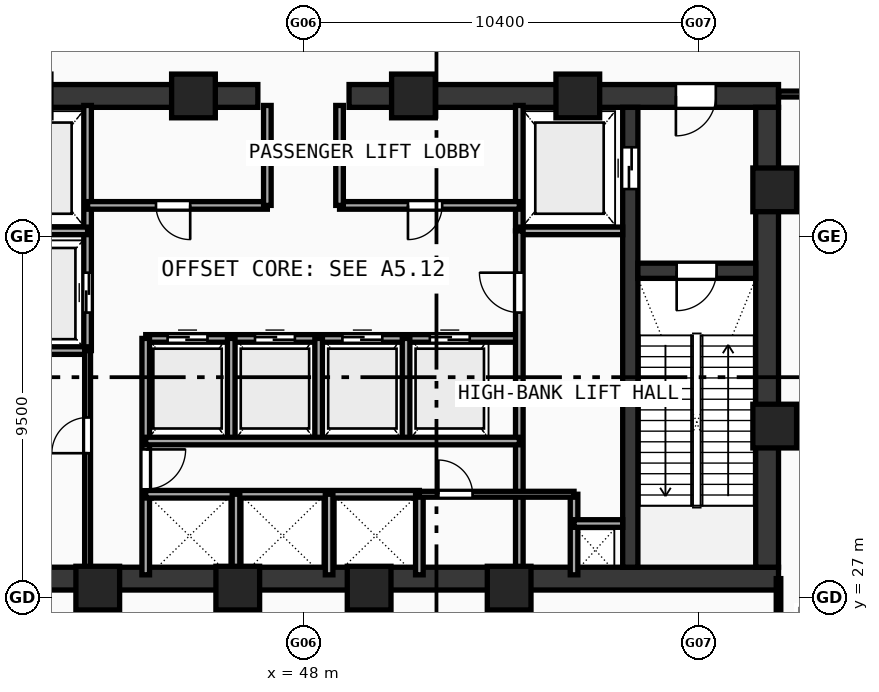
"""IFC4 building model, lengths in metres.
Left out: names, types, materials, properties, quantities, classifications, styles, units other than length and angle.
Written with IfcOpenShell. Run it as: python <this file> out.ifc"""

import sys

from ifc_helpers import new_model, si_unit, direction, frame, frame_2d, origin, origin_with_axes, origin_2d, place, context, subcontext, project, spatial, rectangle, hollow_rectangle, extrude, source, transform, mapped, element, fill, save


model = new_model("IFC4")
c1 = context("Model", 3, precision=1e-05, world=origin(), true_north=direction((0.0, 1.0)))
c2 = subcontext(c1, "Body", "Model", "MODEL_VIEW")
j1 = project(units=[si_unit("LENGTHUNIT", "METRE"), si_unit("PLANEANGLEUNIT", "RADIAN")], contexts=[c1])
p1 = place(None, origin())
s1 = spatial("IfcSite", under=j1, at=p1, CompositionType="ELEMENT")
p2 = place(p1, origin())
s2 = spatial("IfcBuilding", under=s1, at=p2, CompositionType="ELEMENT")
p3 = place(p2, frame((0.0, 0.0, 170.31)))
s3 = spatial("IfcBuildingStorey", under=s2, at=p3, CompositionType="ELEMENT", Elevation=170.31)
p4 = place(p3, frame((35.5, 27.5, 0.0), z_axis=(0.0, 0.0, 1.0), x_axis=(1.0, 0.0, 0.0)))
e1 = element("IfcWall", 1, at=p4, inside=s3, PredefinedType="SHEAR", context=c2, shape_type="SweptSolid", body=[
    extrude(rectangle(XDim=25.0, YDim=0.6, at=frame_2d((12.5, 0.0))), origin(), (0.0, 0.0, 1.0), 5.57),
])
p5 = place(p3, frame((35.5, 40.2, 0.0), z_axis=(0.0, 0.0, 1.0), x_axis=(1.0, 0.0, 0.0)))
e2 = element("IfcWall", 2, at=p5, inside=s3, PredefinedType="SHEAR", context=c2, shape_type="SweptSolid", body=[
    extrude(rectangle(XDim=11.3, YDim=0.6, at=frame_2d((5.65, 0.0))), origin(), (0.0, 0.0, 1.0), 5.57),
])
p6 = place(p5, frame((1.65, 0.0, 0.0)))
e3 = element("IfcOpeningElement", 3, at=p6, cuts=e2, PredefinedType="OPENING", context=c2, shape_type="SweptSolid", body=[
    extrude(rectangle(XDim=1.05, YDim=2.1, at=frame_2d((0.525, 1.05))), frame((0.0, 0.31, 0.0), z_axis=(0.0, -1.0, 0.0), x_axis=(1.0, 0.0, 0.0)), (0.0, 0.0, 1.0), 0.62),
])
p7 = place(p3, frame((49.2, 40.2, 0.0), z_axis=(0.0, 0.0, 1.0), x_axis=(1.0, 0.0, 0.0)))
e4 = element("IfcWall", 4, at=p7, inside=s3, PredefinedType="SHEAR", context=c2, shape_type="SweptSolid", body=[
    extrude(rectangle(XDim=11.3, YDim=0.6, at=frame_2d((5.65, 0.0))), origin(), (0.0, 0.0, 1.0), 5.57),
])
p8 = place(p7, frame((8.6, 0.0, 0.0)))
e5 = element("IfcOpeningElement", 5, at=p8, cuts=e4, PredefinedType="OPENING", context=c2, shape_type="SweptSolid", body=[
    extrude(rectangle(XDim=1.05, YDim=2.1, at=frame_2d((0.525, 1.05))), frame((0.0, 0.31, 0.0), z_axis=(0.0, -1.0, 0.0), x_axis=(1.0, 0.0, 0.0)), (0.0, 0.0, 1.0), 0.62),
])
p9 = place(p3, frame((60.2, 27.8, 0.0), z_axis=(0.0, 0.0, 1.0), x_axis=(0.0, 1.0, 0.0)))
e6 = element("IfcWall", 6, at=p9, inside=s3, PredefinedType="SHEAR", context=c2, shape_type="SweptSolid", body=[
    extrude(rectangle(XDim=12.1, YDim=0.6, at=frame_2d((6.05, 0.0))), origin(), (0.0, 0.0, 1.0), 5.57),
])
p10 = place(p3, frame((56.6, 27.8, 0.0), z_axis=(0.0, 0.0, 1.0), x_axis=(0.0, 1.0, 0.0)))
e7 = element("IfcWall", 7, at=p10, inside=s3, PredefinedType="SHEAR", context=c2, shape_type="SweptSolid", body=[
    extrude(rectangle(XDim=12.1, YDim=0.4, at=frame_2d((6.05, 0.0))), origin(), (0.0, 0.0, 1.0), 5.57),
])
p11 = place(p10, frame((9.95, 0.0, 0.0)))
e8 = element("IfcOpeningElement", 8, at=p11, cuts=e7, PredefinedType="OPENING", context=c2, shape_type="SweptSolid", body=[
    extrude(rectangle(XDim=1.1, YDim=2.1, at=frame_2d((0.55, 1.05))), frame((0.0, 0.21, 0.0), z_axis=(0.0, -1.0, 0.0), x_axis=(1.0, 0.0, 0.0)), (0.0, 0.0, 1.0), 0.42),
])
p12 = place(p3, frame((56.8, 35.6, 0.0), z_axis=(0.0, 0.0, 1.0), x_axis=(1.0, 0.0, 0.0)))
e9 = element("IfcWall", 9, at=p12, inside=s3, PredefinedType="SHEAR", context=c2, shape_type="SweptSolid", body=[
    extrude(rectangle(XDim=3.1, YDim=0.4, at=frame_2d((1.55, 0.0))), origin(), (0.0, 0.0, 1.0), 5.57),
])
p13 = place(p12, frame((1.02, 0.0, 0.0)))
e10 = element("IfcOpeningElement", 10, at=p13, cuts=e9, PredefinedType="OPENING", context=c2, shape_type="SweptSolid", body=[
    extrude(rectangle(XDim=1.05, YDim=2.1, at=frame_2d((0.525, 1.05))), frame((0.0, 0.21, 0.0), z_axis=(0.0, -1.0, 0.0), x_axis=(1.0, 0.0, 0.0)), (0.0, 0.0, 1.0), 0.42),
])
m1 = source(origin(), c2, "Body", "SweptSolid", [
    extrude(hollow_rectangle(XDim=1.15, YDim=1.15, WallThickness=0.048, at=origin_2d()), origin(), (0.0, 0.0, 1.0), 5.83),
])
for number, where, z_axis, x_axis in (
    (11, (42.588, 27.25, -0.26), (0.0, 0.0, 1.0), (1.0, 0.0, 0.0)),
    (12, (46.272, 27.25, -0.26), (0.0, 0.0, 1.0), (1.0, 0.0, 0.0)),
    (13, (49.729, 27.25, -0.26), (0.0, 0.0, 1.0), (1.0, 0.0, 0.0)),
    (14, (53.412, 27.25, -0.26), (0.0, 0.0, 1.0), (1.0, 0.0, 0.0)),
    (15, (60.4, 31.513, -0.26), (0.0, 0.0, 1.0), (1.0, 0.0, 0.0)),
    (16, (60.4, 37.729, -0.26), (0.0, 0.0, 1.0), (1.0, 0.0, 0.0)),
    (17, (55.219, 40.2, -0.26), (0.0, 0.0, 1.0), (1.0, 0.0, 0.0)),
    (18, (50.894, 40.2, -0.26), (0.0, 0.0, 1.0), (1.0, 0.0, 0.0)),
    (19, (45.106, 40.2, -0.26), (0.0, 0.0, 1.0), (1.0, 0.0, 0.0)),
):
    element("IfcColumn", number, at=place(p3, frame(where, z_axis=z_axis, x_axis=x_axis)), inside=s3, PredefinedType="COLUMN", context=c2, shape_type="MappedRepresentation", body=[
        mapped(m1, transform((0.0, 0.0, 0.0), scale=1.0)),
    ])
p14 = place(p3, frame((42.32, 33.5, 0.0), z_axis=(0.0, 0.0, 1.0), x_axis=(0.0, 1.0, 0.0)))
e20 = element("IfcWall", 20, at=p14, inside=s3, PredefinedType="SOLIDWALL", context=c2, shape_type="SweptSolid", body=[
    extrude(rectangle(XDim=6.45, YDim=0.2, at=frame_2d((3.225, 0.0))), origin(), (0.0, 0.0, 1.0), 5.57),
])
p15 = place(p14, frame((1.0, 0.0, 0.0)))
e21 = element("IfcOpeningElement", 21, at=p15, cuts=e20, PredefinedType="OPENING", context=c2, shape_type="SweptSolid", body=[
    extrude(rectangle(XDim=1.05, YDim=2.1, at=frame_2d((0.525, 1.05))), frame((0.0, 0.11, 0.0), z_axis=(0.0, -1.0, 0.0), x_axis=(1.0, 0.0, 0.0)), (0.0, 0.0, 1.0), 0.22),
])
for number, where, z_axis, x_axis in (
    (22, (39.6, 36.65, 0.0), (0.0, 0.0, 1.0), (1.0, 0.0, 0.0)),
    (23, (39.6, 33.5, 0.0), (0.0, 0.0, 1.0), (1.0, 0.0, 0.0)),
):
    element("IfcWall", number, at=place(p3, frame(where, z_axis=z_axis, x_axis=x_axis)), inside=s3, PredefinedType="SOLIDWALL", context=c2, shape_type="SweptSolid", body=[
        extrude(rectangle(XDim=2.72, YDim=0.2, at=frame_2d((1.36, 0.0))), origin(), (0.0, 0.0, 1.0), 5.57),
    ])
p16 = place(p3, frame((53.68, 36.65, 0.0), z_axis=(0.0, 0.0, 1.0), x_axis=(0.0, 1.0, 0.0)))
e24 = element("IfcWall", 24, at=p16, inside=s3, PredefinedType="SOLIDWALL", context=c2, shape_type="SweptSolid", body=[
    extrude(rectangle(XDim=3.3, YDim=0.2, at=frame_2d((1.65, 0.0))), origin(), (0.0, 0.0, 1.0), 5.57),
])
p17 = place(p3, frame((53.68, 36.65, 0.0), z_axis=(0.0, 0.0, 1.0), x_axis=(1.0, 0.0, 0.0)))
e25 = element("IfcWall", 25, at=p17, inside=s3, PredefinedType="SOLIDWALL", context=c2, shape_type="SweptSolid", body=[
    extrude(rectangle(XDim=2.72, YDim=0.2, at=frame_2d((1.36, 0.0))), origin(), (0.0, 0.0, 1.0), 5.57),
])
p18 = place(p3, frame((42.32, 37.32, 0.0), z_axis=(0.0, 0.0, 1.0), x_axis=(1.0, 0.0, 0.0)))
e26 = element("IfcWall", 26, at=p18, inside=s3, PredefinedType="SOLIDWALL", context=c2, shape_type="SweptSolid", body=[
    extrude(rectangle(XDim=4.73, YDim=0.2, at=frame_2d((2.365, 0.0))), origin(), (0.0, 0.0, 1.0), 5.57),
])
p19 = place(p18, frame((1.8, 0.0, 0.0)))
e27 = element("IfcOpeningElement", 27, at=p19, cuts=e26, PredefinedType="OPENING", context=c2, shape_type="SweptSolid", body=[
    extrude(rectangle(XDim=0.9, YDim=2.1, at=frame_2d((0.45, 1.05))), frame((0.0, 0.11, 0.0), z_axis=(0.0, -1.0, 0.0), x_axis=(1.0, 0.0, 0.0)), (0.0, 0.0, 1.0), 0.22),
])
p20 = place(p3, frame((48.95, 37.32, 0.0), z_axis=(0.0, 0.0, 1.0), x_axis=(1.0, 0.0, 0.0)))
e28 = element("IfcWall", 28, at=p20, inside=s3, PredefinedType="SOLIDWALL", context=c2, shape_type="SweptSolid", body=[
    extrude(rectangle(XDim=4.73, YDim=0.2, at=frame_2d((2.365, 0.0))), origin(), (0.0, 0.0, 1.0), 5.57),
])
p21 = place(p20, frame((1.8, 0.0, 0.0)))
e29 = element("IfcOpeningElement", 29, at=p21, cuts=e28, PredefinedType="OPENING", context=c2, shape_type="SweptSolid", body=[
    extrude(rectangle(XDim=0.9, YDim=2.1, at=frame_2d((0.45, 1.05))), frame((0.0, 0.11, 0.0), z_axis=(0.0, -1.0, 0.0), x_axis=(1.0, 0.0, 0.0)), (0.0, 0.0, 1.0), 0.22),
])
for number, where, z_axis, x_axis in (
    (30, (47.05, 37.32, 0.0), (0.0, 0.0, 1.0), (0.0, 1.0, 0.0)),
    (31, (48.95, 37.32, 0.0), (0.0, 0.0, 1.0), (0.0, 1.0, 0.0)),
):
    element("IfcWall", number, at=place(p3, frame(where, z_axis=z_axis, x_axis=x_axis)), inside=s3, PredefinedType="SOLIDWALL", context=c2, shape_type="SweptSolid", body=[
        extrude(rectangle(XDim=2.63, YDim=0.2, at=frame_2d((1.315, 0.0))), origin(), (0.0, 0.0, 1.0), 5.57),
    ])
p22 = place(p3, frame((43.85, 33.82, 0.0), z_axis=(0.0, 0.0, 1.0), x_axis=(1.0, 0.0, 0.0)))
e32 = element("IfcWall", 32, at=p22, inside=s3, PredefinedType="SOLIDWALL", context=c2, shape_type="SweptSolid", body=[
    extrude(rectangle(XDim=9.83, YDim=0.2, at=frame_2d((4.915, 0.0))), origin(), (0.0, 0.0, 1.0), 5.57),
])
p23 = place(p22, frame((0.575, 0.0, 0.0)))
e33 = element("IfcOpeningElement", 33, at=p23, cuts=e32, PredefinedType="OPENING", context=c2, shape_type="SweptSolid", body=[
    extrude(rectangle(XDim=1.05, YDim=2.1, at=frame_2d((0.525, 1.05))), frame((0.0, 0.11, 0.0), z_axis=(0.0, -1.0, 0.0), x_axis=(1.0, 0.0, 0.0)), (0.0, 0.0, 1.0), 0.22),
])
p24 = place(p22, frame((2.875, 0.0, 0.0)))
e34 = element("IfcOpeningElement", 34, at=p24, cuts=e32, PredefinedType="OPENING", context=c2, shape_type="SweptSolid", body=[
    extrude(rectangle(XDim=1.05, YDim=2.1, at=frame_2d((0.525, 1.05))), frame((0.0, 0.11, 0.0), z_axis=(0.0, -1.0, 0.0), x_axis=(1.0, 0.0, 0.0)), (0.0, 0.0, 1.0), 0.22),
])
p25 = place(p22, frame((5.175, 0.0, 0.0)))
e35 = element("IfcOpeningElement", 35, at=p25, cuts=e32, PredefinedType="OPENING", context=c2, shape_type="SweptSolid", body=[
    extrude(rectangle(XDim=1.05, YDim=2.1, at=frame_2d((0.525, 1.05))), frame((0.0, 0.11, 0.0), z_axis=(0.0, -1.0, 0.0), x_axis=(1.0, 0.0, 0.0)), (0.0, 0.0, 1.0), 0.22),
])
p26 = place(p22, frame((7.475, 0.0, 0.0)))
e36 = element("IfcOpeningElement", 36, at=p26, cuts=e32, PredefinedType="OPENING", context=c2, shape_type="SweptSolid", body=[
    extrude(rectangle(XDim=1.05, YDim=2.1, at=frame_2d((0.525, 1.05))), frame((0.0, 0.11, 0.0), z_axis=(0.0, -1.0, 0.0), x_axis=(1.0, 0.0, 0.0)), (0.0, 0.0, 1.0), 0.22),
])
p27 = place(p3, frame((43.85, 27.6, 0.0), z_axis=(0.0, 0.0, 1.0), x_axis=(0.0, 1.0, 0.0)))
e37 = element("IfcWall", 37, at=p27, inside=s3, PredefinedType="SOLIDWALL", context=c2, shape_type="SweptSolid", body=[
    extrude(rectangle(XDim=6.22, YDim=0.2, at=frame_2d((3.11, 0.0))), origin(), (0.0, 0.0, 1.0), 5.57),
])
p28 = place(p27, frame((2.25, 0.0, 0.0)))
e38 = element("IfcOpeningElement", 38, at=p28, cuts=e37, PredefinedType="OPENING", context=c2, shape_type="SweptSolid", body=[
    extrude(rectangle(XDim=1.05, YDim=2.1, at=frame_2d((0.525, 1.05))), frame((0.0, 0.11, 0.0), z_axis=(0.0, -1.0, 0.0), x_axis=(1.0, 0.0, 0.0)), (0.0, 0.0, 1.0), 0.22),
])
p29 = place(p3, frame((53.68, 27.6, 0.0), z_axis=(0.0, 0.0, 1.0), x_axis=(0.0, 1.0, 0.0)))
e39 = element("IfcWall", 39, at=p29, inside=s3, PredefinedType="SOLIDWALL", context=c2, shape_type="SweptSolid", body=[
    extrude(rectangle(XDim=9.05, YDim=0.2, at=frame_2d((4.525, 0.0))), origin(), (0.0, 0.0, 1.0), 2.22),
])
p30 = place(p29, frame((6.9, 0.0, 0.0)))
e40 = element("IfcOpeningElement", 40, at=p30, cuts=e39, PredefinedType="OPENING", context=c2, shape_type="SweptSolid", body=[
    extrude(rectangle(XDim=1.05, YDim=2.1, at=frame_2d((0.525, 1.05))), frame((0.0, 0.11, 0.0), z_axis=(0.0, -1.0, 0.0), x_axis=(1.0, 0.0, 0.0)), (0.0, 0.0, 1.0), 0.22),
])
for number, where, z_axis, x_axis in (
    (41, (46.1, 31.12, 0.0), (0.0, 0.0, 1.0), (0.0, 1.0, 0.0)),
    (42, (48.4, 31.12, 0.0), (0.0, 0.0, 1.0), (0.0, 1.0, 0.0)),
    (43, (50.7, 31.12, 0.0), (0.0, 0.0, 1.0), (0.0, 1.0, 0.0)),
):
    element("IfcWall", number, at=place(p3, frame(where, z_axis=z_axis, x_axis=x_axis)), inside=s3, PredefinedType="SOLIDWALL", context=c2, shape_type="SweptSolid", body=[
        extrude(rectangle(XDim=2.7, YDim=0.2, at=frame_2d((1.35, 0.0))), origin(), (0.0, 0.0, 1.0), 5.57),
    ])
p31 = place(p3, frame((43.85, 29.72, 0.0), z_axis=(0.0, 0.0, 1.0), x_axis=(1.0, 0.0, 0.0)))
e44 = element("IfcWall", 44, at=p31, inside=s3, PredefinedType="SOLIDWALL", context=c2, shape_type="SweptSolid", body=[
    extrude(rectangle(XDim=7.2, YDim=0.2, at=frame_2d((3.6, 0.0))), origin(), (0.0, 0.0, 1.0), 5.57),
])
p32 = place(p3, frame((51.05, 27.6, 0.0), z_axis=(0.0, 0.0, 1.0), x_axis=(0.0, 1.0, 0.0)))
e45 = element("IfcWall", 45, at=p32, inside=s3, PredefinedType="SOLIDWALL", context=c2, shape_type="SweptSolid", body=[
    extrude(rectangle(XDim=2.12, YDim=0.2, at=frame_2d((1.06, 0.0))), origin(), (0.0, 0.0, 1.0), 5.57),
])
p33 = place(p3, frame((43.85, 31.12, 0.0), z_axis=(0.0, 0.0, 1.0), x_axis=(1.0, 0.0, 0.0)))
e46 = element("IfcWall", 46, at=p33, inside=s3, PredefinedType="SOLIDWALL", context=c2, shape_type="SweptSolid", body=[
    extrude(rectangle(XDim=9.83, YDim=0.2, at=frame_2d((4.915, 0.0))), origin(), (0.0, 0.0, 1.0), 5.57),
])
p34 = place(p3, frame((46.225, 27.6, 0.0), z_axis=(0.0, 0.0, 1.0), x_axis=(0.0, 1.0, 0.0)))
e47 = element("IfcWall", 47, at=p34, inside=s3, PredefinedType="SOLIDWALL", context=c2, shape_type="SweptSolid", body=[
    extrude(rectangle(XDim=2.12, YDim=0.2, at=frame_2d((1.06, 0.0))), origin(), (0.0, 0.0, 1.0), 2.22),
])
for number, where, z_axis, x_axis in (
    (48, (48.675, 27.6, 0.0), (0.0, 0.0, 1.0), (0.0, 1.0, 0.0)),
    (49, (55.12, 27.6, 0.0), (0.0, 0.0, 1.0), (0.0, 1.0, 0.0)),
):
    element("IfcWall", number, at=place(p3, frame(where, z_axis=z_axis, x_axis=x_axis)), inside=s3, PredefinedType="SOLIDWALL", context=c2, shape_type="SweptSolid", body=[
        extrude(rectangle(XDim=2.12, YDim=0.2, at=frame_2d((1.06, 0.0))), origin(), (0.0, 0.0, 1.0), 5.57),
    ])
p35 = place(p3, frame((55.12, 28.95, 0.0), z_axis=(0.0, 0.0, 1.0), x_axis=(1.0, 0.0, 0.0)))
e50 = element("IfcWall", 50, at=p35, inside=s3, PredefinedType="SOLIDWALL", context=c2, shape_type="SweptSolid", body=[
    extrude(rectangle(XDim=1.28, YDim=0.2, at=frame_2d((0.64, 0.0))), origin(), (0.0, 0.0, 1.0), 5.57),
])
p36 = place(p3, frame((42.32, 27.6, 0.0), z_axis=(0.0, 0.0, 1.0), x_axis=(0.0, 1.0, 0.0)))
e51 = element("IfcWall", 51, at=p36, inside=s3, PredefinedType="PARTITIONING", context=c2, shape_type="SweptSolid", body=[
    extrude(rectangle(XDim=5.9, YDim=0.155, at=frame_2d((2.95, 0.0))), origin(), (0.0, 0.0, 1.0), 2.22),
])
p37 = place(p36, frame((3.2, 0.0, 0.0)))
e52 = element("IfcOpeningElement", 52, at=p37, cuts=e51, PredefinedType="OPENING", context=c2, shape_type="SweptSolid", body=[
    extrude(rectangle(XDim=0.94, YDim=2.1, at=frame_2d((0.47, 1.05))), frame((0.0, 0.087, 0.0), z_axis=(0.0, -1.0, 0.0), x_axis=(1.0, 0.0, 0.0)), (0.0, 0.0, 1.0), 0.175),
])
p38 = place(p3, frame((51.05, 29.72, 0.0), z_axis=(0.0, 0.0, 1.0), x_axis=(1.0, 0.0, 0.0)))
e53 = element("IfcWall", 53, at=p38, inside=s3, PredefinedType="PARTITIONING", context=c2, shape_type="SweptSolid", body=[
    extrude(rectangle(XDim=4.07, YDim=0.155, at=frame_2d((2.035, 0.0))), origin(), (0.0, 0.0, 1.0), 5.57),
])
p39 = place(p38, frame((0.5, 0.0, 0.0)))
e54 = element("IfcOpeningElement", 54, at=p39, cuts=e53, PredefinedType="OPENING", context=c2, shape_type="SweptSolid", body=[
    extrude(rectangle(XDim=0.9, YDim=2.1, at=frame_2d((0.45, 1.05))), frame((0.0, 0.087, 0.0), z_axis=(0.0, -1.0, 0.0), x_axis=(1.0, 0.0, 0.0)), (0.0, 0.0, 1.0), 0.175),
])
p40 = place(p3, frame((60.5, 40.25, 0.0), z_axis=(0.0, 0.0, 1.0), x_axis=(1.0, 0.0, 0.0)))
e55 = element("IfcWall", 55, at=p40, inside=s3, PredefinedType="PARTITIONING", context=c2, shape_type="SweptSolid", body=[
    extrude(rectangle(XDim=4.05, YDim=0.155, at=frame_2d((2.025, 0.0))), origin(), (0.0, 0.0, 1.0), 5.57),
])
p41 = place(p3, frame((60.5, 23.65, 0.0), z_axis=(0.0, 0.0, 1.0), x_axis=(0.0, 1.0, 0.0)))
e56 = element("IfcWall", 56, at=p41, inside=s3, PredefinedType="PARTITIONING", context=c2, shape_type="SweptSolid", body=[
    extrude(rectangle(XDim=3.85, YDim=0.12, at=frame_2d((1.925, 0.0))), origin(), (0.0, 0.0, 1.0), 5.17),
])
m2 = source(origin(), c2, "Body", "SweptSolid", [
    extrude(rectangle(XDim=1.05, YDim=2.1, at=frame_2d((0.525, 1.05))), frame((0.0, 0.025, 0.0), z_axis=(0.0, -1.0, 0.0), x_axis=(1.0, 0.0, 0.0)), (0.0, 0.0, 1.0), 0.05),
])
p42 = place(p13, frame((1.05, 0.0, 0.0), z_axis=(0.0, 0.0, 1.0), x_axis=(-1.0, 0.0, 0.0)))
e57 = element("IfcDoor", 57, at=p42, inside=s3, OperationType="SINGLE_SWING_RIGHT", PredefinedType="DOOR", context=c2, shape_type="MappedRepresentation", body=[
    mapped(m2, transform((0.0, 0.0, 0.0), scale=1.0)),
])
fill(e10, e57)
p43 = place(p8, frame((1.05, 0.0, 0.0), z_axis=(0.0, 0.0, 1.0), x_axis=(-1.0, 0.0, 0.0)))
e58 = element("IfcDoor", 58, at=p43, inside=s3, OperationType="SINGLE_SWING_RIGHT", PredefinedType="DOOR", context=c2, shape_type="MappedRepresentation", body=[
    mapped(m2, transform((0.0, 0.0, 0.0), scale=1.0)),
])
fill(e5, e58)
m3 = source(origin(), c2, "Body", "SweptSolid", [
    extrude(rectangle(XDim=1.1, YDim=2.1, at=frame_2d((0.55, 1.05))), frame((0.0, 0.025, 0.0), z_axis=(0.0, -1.0, 0.0), x_axis=(1.0, 0.0, 0.0)), (0.0, 0.0, 1.0), 0.05),
])
p44 = place(p11, origin_with_axes())
e59 = element("IfcDoor", 59, at=p44, inside=s3, OperationType="DOUBLE_DOOR_SLIDING", PredefinedType="DOOR", context=c2, shape_type="MappedRepresentation", body=[
    mapped(m3, transform((0.0, 0.0, 0.0), scale=1.0)),
])
fill(e8, e59)
p45 = place(p15, origin_with_axes())
e60 = element("IfcDoor", 60, at=p45, inside=s3, OperationType="DOUBLE_DOOR_SLIDING", PredefinedType="DOOR", context=c2, shape_type="MappedRepresentation", body=[
    mapped(m2, transform((0.0, 0.0, 0.0), scale=1.0)),
])
fill(e21, e60)
m4 = source(origin(), c2, "Body", "SweptSolid", [
    extrude(rectangle(XDim=0.9, YDim=2.1, at=frame_2d((0.45, 1.05))), frame((0.0, 0.025, 0.0), z_axis=(0.0, -1.0, 0.0), x_axis=(1.0, 0.0, 0.0)), (0.0, 0.0, 1.0), 0.05),
])
p46 = place(p19, frame((0.9, 0.0, 0.0), z_axis=(0.0, 0.0, 1.0), x_axis=(-1.0, 0.0, 0.0)))
e61 = element("IfcDoor", 61, at=p46, inside=s3, OperationType="SINGLE_SWING_LEFT", PredefinedType="DOOR", context=c2, shape_type="MappedRepresentation", body=[
    mapped(m4, transform((0.0, 0.0, 0.0), scale=1.0)),
])
fill(e27, e61)
p47 = place(p21, frame((0.9, 0.0, 0.0), z_axis=(0.0, 0.0, 1.0), x_axis=(-1.0, 0.0, 0.0)))
e62 = element("IfcDoor", 62, at=p47, inside=s3, OperationType="SINGLE_SWING_RIGHT", PredefinedType="DOOR", context=c2, shape_type="MappedRepresentation", body=[
    mapped(m4, transform((0.0, 0.0, 0.0), scale=1.0)),
])
fill(e29, e62)
p48 = place(p23, origin_with_axes())
e63 = element("IfcDoor", 63, at=p48, inside=s3, OperationType="DOUBLE_DOOR_SLIDING", PredefinedType="DOOR", context=c2, shape_type="MappedRepresentation", body=[
    mapped(m2, transform((0.0, 0.0, 0.0), scale=1.0)),
])
fill(e33, e63)
p49 = place(p24, origin_with_axes())
e64 = element("IfcDoor", 64, at=p49, inside=s3, OperationType="DOUBLE_DOOR_SLIDING", PredefinedType="DOOR", context=c2, shape_type="MappedRepresentation", body=[
    mapped(m2, transform((0.0, 0.0, 0.0), scale=1.0)),
])
fill(e34, e64)
p50 = place(p25, origin_with_axes())
e65 = element("IfcDoor", 65, at=p50, inside=s3, OperationType="DOUBLE_DOOR_SLIDING", PredefinedType="DOOR", context=c2, shape_type="MappedRepresentation", body=[
    mapped(m2, transform((0.0, 0.0, 0.0), scale=1.0)),
])
fill(e35, e65)
p51 = place(p26, origin_with_axes())
e66 = element("IfcDoor", 66, at=p51, inside=s3, OperationType="DOUBLE_DOOR_SLIDING", PredefinedType="DOOR", context=c2, shape_type="MappedRepresentation", body=[
    mapped(m2, transform((0.0, 0.0, 0.0), scale=1.0)),
])
fill(e36, e66)
p52 = place(p28, frame((1.05, 0.0, 0.0), z_axis=(0.0, 0.0, 1.0), x_axis=(-1.0, 0.0, 0.0)))
e67 = element("IfcDoor", 67, at=p52, inside=s3, OperationType="SINGLE_SWING_LEFT", PredefinedType="DOOR", context=c2, shape_type="MappedRepresentation", body=[
    mapped(m2, transform((0.0, 0.0, 0.0), scale=1.0)),
])
fill(e38, e67)
p53 = place(p30, origin_with_axes())
e68 = element("IfcDoor", 68, at=p53, inside=s3, OperationType="SINGLE_SWING_RIGHT", PredefinedType="DOOR", context=c2, shape_type="MappedRepresentation", body=[
    mapped(m2, transform((0.0, 0.0, 0.0), scale=1.0)),
])
fill(e40, e68)
m5 = source(origin(), c2, "Body", "SweptSolid", [
    extrude(rectangle(XDim=0.94, YDim=2.1, at=frame_2d((0.47, 1.05))), frame((0.0, 0.025, 0.0), z_axis=(0.0, -1.0, 0.0), x_axis=(1.0, 0.0, 0.0)), (0.0, 0.0, 1.0), 0.05),
])
p54 = place(p37, origin_with_axes())
e69 = element("IfcDoor", 69, at=p54, inside=s3, OperationType="SINGLE_SWING_LEFT", PredefinedType="DOOR", context=c2, shape_type="MappedRepresentation", body=[
    mapped(m5, transform((0.0, 0.0, 0.0), scale=1.0)),
])
fill(e52, e69)
p55 = place(p39, origin_with_axes())
e70 = element("IfcDoor", 70, at=p55, inside=s3, OperationType="SINGLE_SWING_LEFT", PredefinedType="DOOR", context=c2, shape_type="MappedRepresentation", body=[
    mapped(m4, transform((0.0, 0.0, 0.0), scale=1.0)),
])
fill(e54, e70)
save(model, sys.argv[1])
